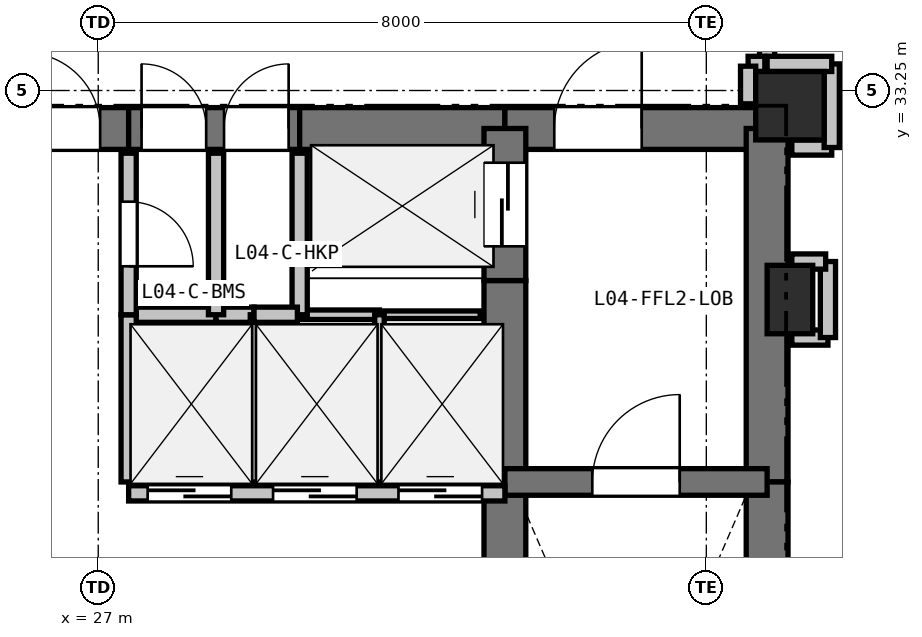
"""IFC4 building model, lengths in metres.
Left out: names, types, materials, properties, quantities, classifications, styles, units other than length and angle.
Written with IfcOpenShell. Run it as: python <this file> out.ifc"""

import sys

from ifc_helpers import new_model, si_unit, direction, frame, frame_2d, origin, origin_2d, place, context, subcontext, project, spatial, rectangle, extrude, element, fill, save


model = new_model("IFC4")
c1 = context("Model", 3, precision=1e-05, world=origin(), true_north=direction((0.0, 1.0)))
c2 = subcontext(c1, "Body", "Model", "MODEL_VIEW")
j1 = project(units=[si_unit("LENGTHUNIT", "METRE"), si_unit("PLANEANGLEUNIT", "RADIAN")], contexts=[c1])
p1 = place(None, origin())
s1 = spatial("IfcSite", under=j1, at=p1, CompositionType="ELEMENT")
p2 = place(p1, origin())
s2 = spatial("IfcBuilding", under=s1, at=p2, CompositionType="ELEMENT")
p3 = place(p2, frame((0.0, 0.0, 19.2)))
s3 = spatial("IfcBuildingStorey", under=s2, at=p3, CompositionType="ELEMENT", Elevation=19.2)
p4 = place(p3, frame((36.1, 33.05, 0.0), z_axis=(0.0, 0.0, 1.0), x_axis=(1.0, 0.0, 0.0)))
e1 = element("IfcColumn", 1, at=p4, inside=s3, PredefinedType="COLUMN", context=c2, shape_type="SweptSolid", body=[
    extrude(rectangle(XDim=0.9, YDim=0.9, at=origin_2d()), origin(), (0.0, 0.0, 1.0), 3.3),
])
p5 = place(p3, frame((36.1, 30.5, 0.0), z_axis=(0.0, 0.0, 1.0), x_axis=(1.0, 0.0, 0.0)))
e2 = element("IfcColumn", 2, at=p5, inside=s3, PredefinedType="PILASTER", context=c2, shape_type="SweptSolid", body=[
    extrude(rectangle(XDim=0.6, YDim=0.9, at=origin_2d()), origin(), (0.0, 0.0, 1.0), 3.3),
])
p6 = place(p3, frame((25.65, 32.75, 0.0), z_axis=(0.0, 0.0, 1.0), x_axis=(1.0, 0.0, 0.0)))
e3 = element("IfcWall", 3, at=p6, inside=s3, PredefinedType="SHEAR", context=c2, shape_type="SweptSolid", body=[
    extrude(rectangle(XDim=1.75, YDim=0.55, at=frame_2d((0.875, 0.0))), origin(), (0.0, 0.0, 1.0), 3.04),
])
p7 = place(p6, frame((0.375, 0.0, 0.0)))
e4 = element("IfcOpeningElement", 4, at=p7, cuts=e3, PredefinedType="OPENING", context=c2, shape_type="SweptSolid", body=[
    extrude(rectangle(XDim=1.0, YDim=2.15, at=frame_2d((0.5, 1.075))), frame((0.0, 0.285, 0.0), z_axis=(0.0, -1.0, 0.0), x_axis=(1.0, 0.0, 0.0)), (0.0, 0.0, 1.0), 0.57),
])
p8 = place(p3, frame((27.4, 32.75, 0.0), z_axis=(0.0, 0.0, 1.0), x_axis=(1.0, 0.0, 0.0)))
e5 = element("IfcWall", 5, at=p8, inside=s3, PredefinedType="SHEAR", context=c2, shape_type="SweptSolid", body=[
    extrude(rectangle(XDim=2.25, YDim=0.55, at=frame_2d((1.125, 0.0))), origin(), (0.0, 0.0, 1.0), 3.04),
])
p9 = place(p8, frame((0.17, 0.0, 0.0)))
e6 = element("IfcOpeningElement", 6, at=p9, cuts=e5, PredefinedType="OPENING", context=c2, shape_type="SweptSolid", body=[
    extrude(rectangle(XDim=0.85, YDim=2.1, at=frame_2d((0.425, 1.05))), frame((0.0, 0.285, 0.0), z_axis=(0.0, -1.0, 0.0), x_axis=(1.0, 0.0, 0.0)), (0.0, 0.0, 1.0), 0.57),
])
p10 = place(p8, frame((1.255, 0.0, 0.0)))
e7 = element("IfcOpeningElement", 7, at=p10, cuts=e5, PredefinedType="OPENING", context=c2, shape_type="SweptSolid", body=[
    extrude(rectangle(XDim=0.85, YDim=2.1, at=frame_2d((0.425, 1.05))), frame((0.0, 0.285, 0.0), z_axis=(0.0, -1.0, 0.0), x_axis=(1.0, 0.0, 0.0)), (0.0, 0.0, 1.0), 0.57),
])
p11 = place(p3, frame((29.65, 32.75, 0.0), z_axis=(0.0, 0.0, 1.0), x_axis=(1.0, 0.0, 0.0)))
e8 = element("IfcWall", 8, at=p11, inside=s3, PredefinedType="SHEAR", context=c2, shape_type="SweptSolid", body=[
    extrude(rectangle(XDim=2.7, YDim=0.55, at=frame_2d((1.35, 0.0))), origin(), (0.0, 0.0, 1.0), 3.04),
])
p12 = place(p3, frame((32.35, 32.75, 0.0), z_axis=(0.0, 0.0, 1.0), x_axis=(1.0, 0.0, 0.0)))
e9 = element("IfcWall", 9, at=p12, inside=s3, PredefinedType="SHEAR", context=c2, shape_type="SweptSolid", body=[
    extrude(rectangle(XDim=3.45, YDim=0.55, at=frame_2d((1.725, 0.0))), origin(), (0.0, 0.0, 1.0), 3.04),
])
p13 = place(p12, frame((0.65, 0.0, 0.0)))
e10 = element("IfcOpeningElement", 10, at=p13, cuts=e9, PredefinedType="OPENING", context=c2, shape_type="SweptSolid", body=[
    extrude(rectangle(XDim=1.15, YDim=2.15, at=frame_2d((0.575, 1.075))), frame((0.0, 0.285, 0.0), z_axis=(0.0, -1.0, 0.0), x_axis=(1.0, 0.0, 0.0)), (0.0, 0.0, 1.0), 0.57),
])
p14 = place(p3, frame((35.8, 32.75, 0.0), z_axis=(0.0, 0.0, 1.0), x_axis=(0.0, -1.0, 0.0)))
e11 = element("IfcWall", 11, at=p14, inside=s3, PredefinedType="SHEAR", context=c2, shape_type="SweptSolid", body=[
    extrude(rectangle(XDim=4.65, YDim=0.55, at=frame_2d((2.325, 0.0))), origin(), (0.0, 0.0, 1.0), 3.04),
])
p15 = place(p3, frame((35.8, 28.1, 0.0), z_axis=(0.0, 0.0, 1.0), x_axis=(0.0, -1.0, 0.0)))
e12 = element("IfcWall", 12, at=p15, inside=s3, PredefinedType="SHEAR", context=c2, shape_type="SweptSolid", body=[
    extrude(rectangle(XDim=7.35, YDim=0.55, at=frame_2d((3.675, 0.0))), origin(), (0.0, 0.0, 1.0), 3.04),
])
p16 = place(p3, frame((32.35, 25.55, 0.0), z_axis=(0.0, 0.0, 1.0), x_axis=(0.0, 1.0, 0.0)))
e13 = element("IfcWall", 13, at=p16, inside=s3, PredefinedType="SHEAR", context=c2, shape_type="SweptSolid", body=[
    extrude(rectangle(XDim=2.4, YDim=0.55, at=frame_2d((1.2, 0.0))), origin(), (0.0, 0.0, 1.0), 3.04),
])
p17 = place(p3, frame((32.35, 27.95, 0.0), z_axis=(0.0, 0.0, 1.0), x_axis=(0.0, 1.0, 0.0)))
e14 = element("IfcWall", 14, at=p17, inside=s3, PredefinedType="SHEAR", context=c2, shape_type="SweptSolid", body=[
    extrude(rectangle(XDim=2.8, YDim=0.55, at=frame_2d((1.4, 0.0))), origin(), (0.0, 0.0, 1.0), 3.04),
])
p18 = place(p3, frame((32.35, 30.75, 0.0), z_axis=(0.0, 0.0, 1.0), x_axis=(0.0, 1.0, 0.0)))
e15 = element("IfcWall", 15, at=p18, inside=s3, PredefinedType="SHEAR", context=c2, shape_type="SweptSolid", body=[
    extrude(rectangle(XDim=2.0, YDim=0.55, at=frame_2d((1.0, 0.0))), origin(), (0.0, 0.0, 1.0), 3.04),
])
p19 = place(p18, frame((0.45, 0.0, 0.0)))
e16 = element("IfcOpeningElement", 16, at=p19, cuts=e15, PredefinedType="OPENING", context=c2, shape_type="SweptSolid", body=[
    extrude(rectangle(XDim=1.1, YDim=2.15, at=frame_2d((0.55, 1.075))), frame((0.0, 0.285, 0.0), z_axis=(0.0, -1.0, 0.0), x_axis=(1.0, 0.0, 0.0)), (0.0, 0.0, 1.0), 0.57),
])
p20 = place(p3, frame((32.35, 28.1, 0.0), z_axis=(0.0, 0.0, 1.0), x_axis=(1.0, 0.0, 0.0)))
e17 = element("IfcWall", 17, at=p20, inside=s3, PredefinedType="SHEAR", context=c2, shape_type="SweptSolid", body=[
    extrude(rectangle(XDim=3.45, YDim=0.35, at=frame_2d((1.725, 0.0))), origin(), (0.0, 0.0, 1.0), 3.04),
])
p21 = place(p20, frame((1.15, 0.0, 0.0)))
e18 = element("IfcOpeningElement", 18, at=p21, cuts=e17, PredefinedType="OPENING", context=c2, shape_type="SweptSolid", body=[
    extrude(rectangle(XDim=1.15, YDim=2.15, at=frame_2d((0.575, 1.075))), frame((0.0, 0.185, 0.0), z_axis=(0.0, -1.0, 0.0), x_axis=(1.0, 0.0, 0.0)), (0.0, 0.0, 1.0), 0.37),
])
p22 = place(p3, frame((27.4, 27.95, 0.0), z_axis=(0.0, 0.0, 1.0), x_axis=(1.0, 0.0, 0.0)))
e19 = element("IfcWall", 19, at=p22, inside=s3, PredefinedType="PARTITIONING", context=c2, shape_type="SweptSolid", body=[
    extrude(rectangle(XDim=4.95, YDim=0.2, at=frame_2d((2.475, 0.0))), origin(), (0.0, 0.0, 1.0), 3.04),
])
p23 = place(p22, frame((0.25, 0.0, 0.0)))
e20 = element("IfcOpeningElement", 20, at=p23, cuts=e19, PredefinedType="OPENING", context=c2, shape_type="SweptSolid", body=[
    extrude(rectangle(XDim=1.1, YDim=2.15, at=frame_2d((0.55, 1.075))), frame((0.0, 0.11, 0.0), z_axis=(0.0, -1.0, 0.0), x_axis=(1.0, 0.0, 0.0)), (0.0, 0.0, 1.0), 0.22),
])
p24 = place(p22, frame((1.9, 0.0, 0.0)))
e21 = element("IfcOpeningElement", 21, at=p24, cuts=e19, PredefinedType="OPENING", context=c2, shape_type="SweptSolid", body=[
    extrude(rectangle(XDim=1.1, YDim=2.15, at=frame_2d((0.55, 1.075))), frame((0.0, 0.11, 0.0), z_axis=(0.0, -1.0, 0.0), x_axis=(1.0, 0.0, 0.0)), (0.0, 0.0, 1.0), 0.22),
])
p25 = place(p22, frame((3.55, 0.0, 0.0)))
e22 = element("IfcOpeningElement", 22, at=p25, cuts=e19, PredefinedType="OPENING", context=c2, shape_type="SweptSolid", body=[
    extrude(rectangle(XDim=1.1, YDim=2.15, at=frame_2d((0.55, 1.075))), frame((0.0, 0.11, 0.0), z_axis=(0.0, -1.0, 0.0), x_axis=(1.0, 0.0, 0.0)), (0.0, 0.0, 1.0), 0.22),
])
p26 = place(p3, frame((32.025, 30.3, 0.0), z_axis=(0.0, 0.0, 1.0), x_axis=(-1.0, 0.0, 0.0)))
e23 = element("IfcWall", 23, at=p26, inside=s3, PredefinedType="PARTITIONING", context=c2, shape_type="SweptSolid", body=[
    extrude(rectangle(XDim=1.325, YDim=0.1, at=frame_2d((0.663, 0.0))), origin(), (0.0, 0.0, 1.0), 3.04),
])
p27 = place(p3, frame((30.7, 30.3, 0.0), z_axis=(0.0, 0.0, 1.0), x_axis=(-1.0, 0.0, 0.0)))
e24 = element("IfcWall", 24, at=p27, inside=s3, PredefinedType="PARTITIONING", context=c2, shape_type="SweptSolid", body=[
    extrude(rectangle(XDim=1.05, YDim=0.125, at=frame_2d((0.525, 0.0))), origin(), (0.0, 0.0, 1.0), 3.04),
])
p28 = place(p3, frame((29.65, 30.3, 0.0), z_axis=(0.0, 0.0, 1.0), x_axis=(0.0, 1.0, 0.0)))
e25 = element("IfcWall", 25, at=p28, inside=s3, PredefinedType="PARTITIONING", context=c2, shape_type="SweptSolid", body=[
    extrude(rectangle(XDim=2.125, YDim=0.2, at=frame_2d((1.062, 0.0))), origin(), (0.0, 0.0, 1.0), 3.04),
])
p29 = place(p3, frame((27.4, 30.3, 0.0), z_axis=(0.0, 0.0, 1.0), x_axis=(1.0, 0.0, 0.0)))
e26 = element("IfcWall", 26, at=p29, inside=s3, PredefinedType="PARTITIONING", context=c2, shape_type="SweptSolid", body=[
    extrude(rectangle(XDim=1.15, YDim=0.2, at=frame_2d((0.575, 0.0))), origin(), (0.0, 0.0, 1.0), 3.04),
])
p30 = place(p3, frame((28.55, 30.3, 0.0), z_axis=(0.0, 0.0, 1.0), x_axis=(1.0, 0.0, 0.0)))
e27 = element("IfcWall", 27, at=p30, inside=s3, PredefinedType="PARTITIONING", context=c2, shape_type="SweptSolid", body=[
    extrude(rectangle(XDim=0.5, YDim=0.2, at=frame_2d((0.25, 0.0))), origin(), (0.0, 0.0, 1.0), 3.04),
])
p31 = place(p3, frame((29.05, 30.3, 0.0), z_axis=(0.0, 0.0, 1.0), x_axis=(0.0, -1.0, 0.0)))
e28 = element("IfcWall", 28, at=p31, inside=s3, PredefinedType="PARTITIONING", context=c2, shape_type="SweptSolid", body=[
    extrude(rectangle(XDim=2.2, YDim=0.1, at=frame_2d((1.1, 0.0))), origin(), (0.0, 0.0, 1.0), 3.04),
])
p32 = place(p3, frame((27.4, 28.1, 0.0), z_axis=(0.0, 0.0, 1.0), x_axis=(0.0, 1.0, 0.0)))
e29 = element("IfcWall", 29, at=p32, inside=s3, PredefinedType="PARTITIONING", context=c2, shape_type="SweptSolid", body=[
    extrude(rectangle(XDim=2.2, YDim=0.2, at=frame_2d((1.1, 0.0))), origin(), (0.0, 0.0, 1.0), 3.04),
])
p33 = place(p3, frame((29.05, 30.3, 0.0), z_axis=(0.0, 0.0, 1.0), x_axis=(1.0, 0.0, 0.0)))
e30 = element("IfcWall", 30, at=p33, inside=s3, PredefinedType="PARTITIONING", context=c2, shape_type="SweptSolid", body=[
    extrude(rectangle(XDim=0.57, YDim=0.2, at=frame_2d((0.285, 0.0))), origin(), (0.0, 0.0, 1.0), 3.04),
])
p34 = place(p3, frame((30.7, 30.3, 0.0), z_axis=(0.0, 0.0, 1.0), x_axis=(0.0, -1.0, 0.0)))
e31 = element("IfcWall", 31, at=p34, inside=s3, PredefinedType="PARTITIONING", context=c2, shape_type="SweptSolid", body=[
    extrude(rectangle(XDim=2.2, YDim=0.125, at=frame_2d((1.1, 0.0))), origin(), (0.0, 0.0, 1.0), 3.04),
])
p35 = place(p3, frame((27.4, 32.425, 0.0), z_axis=(0.0, 0.0, 1.0), x_axis=(0.0, -1.0, 0.0)))
e32 = element("IfcWall", 32, at=p35, inside=s3, PredefinedType="PARTITIONING", context=c2, shape_type="SweptSolid", body=[
    extrude(rectangle(XDim=2.125, YDim=0.2, at=frame_2d((1.062, 0.0))), origin(), (0.0, 0.0, 1.0), 3.04),
])
p36 = place(p35, frame((0.637, 0.0, 0.0)))
e33 = element("IfcOpeningElement", 33, at=p36, cuts=e32, PredefinedType="OPENING", context=c2, shape_type="SweptSolid", body=[
    extrude(rectangle(XDim=0.85, YDim=2.1, at=frame_2d((0.425, 1.05))), frame((0.0, 0.11, 0.0), z_axis=(0.0, -1.0, 0.0), x_axis=(1.0, 0.0, 0.0)), (0.0, 0.0, 1.0), 0.22),
])
p37 = place(p3, frame((35.8, 35.35, 0.0), z_axis=(0.0, 0.0, 1.0), x_axis=(0.0, -1.0, 0.0)))
e34 = element("IfcWall", 34, at=p37, inside=s3, PredefinedType="PARTITIONING", context=c2, shape_type="SweptSolid", body=[
    extrude(rectangle(XDim=1.75, YDim=0.2, at=frame_2d((0.875, 0.0))), origin(), (0.0, 0.0, 1.0), 3.04),
])
p38 = place(p37, frame((0.375, 0.0, 0.0)))
e35 = element("IfcOpeningElement", 35, at=p38, cuts=e34, PredefinedType="OPENING", context=c2, shape_type="SweptSolid", body=[
    extrude(rectangle(XDim=1.0, YDim=2.15, at=frame_2d((0.5, 1.075))), frame((0.0, 0.11, 0.0), z_axis=(0.0, -1.0, 0.0), x_axis=(1.0, 0.0, 0.0)), (0.0, 0.0, 1.0), 0.22),
])
p39 = place(p3, frame((35.77, 33.6, 0.0), z_axis=(0.0, 0.0, 1.0), x_axis=(-1.0, 0.0, 0.0)))
e36 = element("IfcWall", 36, at=p39, inside=s3, PredefinedType="PARTITIONING", context=c2, shape_type="SweptSolid", body=[
    extrude(rectangle(XDim=0.22, YDim=0.2, at=frame_2d((0.11, 0.0))), origin(), (0.0, 0.0, 1.0), 3.04),
])
p40 = place(p3, frame((35.55, 33.57, 0.0), z_axis=(0.0, 0.0, 1.0), x_axis=(0.0, -1.0, 0.0)))
e37 = element("IfcWall", 37, at=p40, inside=s3, PredefinedType="PARTITIONING", context=c2, shape_type="SweptSolid", body=[
    extrude(rectangle(XDim=0.495, YDim=0.2, at=frame_2d((0.248, 0.0))), origin(), (0.0, 0.0, 1.0), 2.488),
])
p41 = place(p3, frame((36.125, 30.0, 0.0), z_axis=(0.0, 0.0, 1.0), x_axis=(1.0, 0.0, 0.0)))
e38 = element("IfcWall", 38, at=p41, inside=s3, PredefinedType="PARTITIONING", context=c2, shape_type="SweptSolid", body=[
    extrude(rectangle(XDim=0.475, YDim=0.2, at=frame_2d((0.238, 0.0))), origin(), (0.0, 0.0, 1.0), 2.488),
])
p42 = place(p3, frame((36.6, 30.0, 0.0), z_axis=(0.0, 0.0, 1.0), x_axis=(0.0, 1.0, 0.0)))
e39 = element("IfcWall", 39, at=p42, inside=s3, PredefinedType="PARTITIONING", context=c2, shape_type="SweptSolid", body=[
    extrude(rectangle(XDim=1.0, YDim=0.2, at=frame_2d((0.5, 0.0))), origin(), (0.0, 0.0, 1.0), 3.04),
])
p43 = place(p3, frame((36.57, 31.0, 0.0), z_axis=(0.0, 0.0, 1.0), x_axis=(-1.0, 0.0, 0.0)))
e40 = element("IfcWall", 40, at=p43, inside=s3, PredefinedType="PARTITIONING", context=c2, shape_type="SweptSolid", body=[
    extrude(rectangle(XDim=0.445, YDim=0.2, at=frame_2d((0.223, 0.0))), origin(), (0.0, 0.0, 1.0), 2.488),
])
p44 = place(p3, frame((36.125, 32.5, 0.0), z_axis=(0.0, 0.0, 1.0), x_axis=(1.0, 0.0, 0.0)))
e41 = element("IfcWall", 41, at=p44, inside=s3, PredefinedType="PARTITIONING", context=c2, shape_type="SweptSolid", body=[
    extrude(rectangle(XDim=0.525, YDim=0.2, at=frame_2d((0.262, 0.0))), origin(), (0.0, 0.0, 1.0), 2.488),
])
p45 = place(p3, frame((36.65, 32.5, 0.0), z_axis=(0.0, 0.0, 1.0), x_axis=(0.0, 1.0, 0.0)))
e42 = element("IfcWall", 42, at=p45, inside=s3, PredefinedType="PARTITIONING", context=c2, shape_type="SweptSolid", body=[
    extrude(rectangle(XDim=1.1, YDim=0.2, at=frame_2d((0.55, 0.0))), origin(), (0.0, 0.0, 1.0), 2.338),
])
p46 = place(p3, frame((36.65, 33.6, 0.0), z_axis=(0.0, 0.0, 1.0), x_axis=(-1.0, 0.0, 0.0)))
e43 = element("IfcWall", 43, at=p46, inside=s3, PredefinedType="PARTITIONING", context=c2, shape_type="SweptSolid", body=[
    extrude(rectangle(XDim=0.85, YDim=0.2, at=frame_2d((0.425, 0.0))), origin(), (0.0, 0.0, 1.0), 2.338),
])
p47 = place(p3, frame((28.55, 32.425, 0.0), z_axis=(0.0, 0.0, 1.0), x_axis=(0.0, -1.0, 0.0)))
e44 = element("IfcWall", 44, at=p47, inside=s3, PredefinedType="PARTITIONING", context=c2, shape_type="SweptSolid", body=[
    extrude(rectangle(XDim=2.125, YDim=0.2, at=frame_2d((1.062, 0.0))), origin(), (0.0, 0.0, 1.0), 3.04),
])
p48 = place(p23, origin())
e45 = element("IfcDoor", 45, at=p48, inside=s3, OperationType="SLIDING_TO_LEFT", PredefinedType="DOOR", context=c2, shape_type="SweptSolid", body=[
    extrude(rectangle(XDim=1.1, YDim=2.15, at=frame_2d((0.55, 1.075))), frame((0.0, 0.025, 0.0), z_axis=(0.0, -1.0, 0.0), x_axis=(1.0, 0.0, 0.0)), (0.0, 0.0, 1.0), 0.05),
])
fill(e20, e45)
p49 = place(p24, origin())
e46 = element("IfcDoor", 46, at=p49, inside=s3, OperationType="SLIDING_TO_LEFT", PredefinedType="DOOR", context=c2, shape_type="SweptSolid", body=[
    extrude(rectangle(XDim=1.1, YDim=2.15, at=frame_2d((0.55, 1.075))), frame((0.0, 0.025, 0.0), z_axis=(0.0, -1.0, 0.0), x_axis=(1.0, 0.0, 0.0)), (0.0, 0.0, 1.0), 0.05),
])
fill(e21, e46)
p50 = place(p25, origin())
e47 = element("IfcDoor", 47, at=p50, inside=s3, OperationType="SLIDING_TO_LEFT", PredefinedType="DOOR", context=c2, shape_type="SweptSolid", body=[
    extrude(rectangle(XDim=1.1, YDim=2.15, at=frame_2d((0.55, 1.075))), frame((0.0, 0.025, 0.0), z_axis=(0.0, -1.0, 0.0), x_axis=(1.0, 0.0, 0.0)), (0.0, 0.0, 1.0), 0.05),
])
fill(e22, e47)
p51 = place(p7, origin())
e48 = element("IfcDoor", 48, at=p51, inside=s3, OperationType="SINGLE_SWING_LEFT", PredefinedType="DOOR", context=c2, shape_type="SweptSolid", body=[
    extrude(rectangle(XDim=1.0, YDim=2.15, at=frame_2d((0.5, 1.075))), frame((0.0, 0.025, 0.0), z_axis=(0.0, -1.0, 0.0), x_axis=(1.0, 0.0, 0.0)), (0.0, 0.0, 1.0), 0.05),
])
fill(e4, e48)
p52 = place(p19, origin())
e49 = element("IfcDoor", 49, at=p52, inside=s3, OperationType="SLIDING_TO_LEFT", PredefinedType="DOOR", context=c2, shape_type="SweptSolid", body=[
    extrude(rectangle(XDim=1.1, YDim=2.15, at=frame_2d((0.55, 1.075))), frame((0.0, 0.025, 0.0), z_axis=(0.0, -1.0, 0.0), x_axis=(1.0, 0.0, 0.0)), (0.0, 0.0, 1.0), 0.05),
])
fill(e16, e49)
p53 = place(p21, origin())
e50 = element("IfcDoor", 50, at=p53, inside=s3, OperationType="SINGLE_SWING_RIGHT", PredefinedType="DOOR", context=c2, shape_type="SweptSolid", body=[
    extrude(rectangle(XDim=1.15, YDim=2.15, at=frame_2d((0.575, 1.075))), frame((0.0, 0.025, 0.0), z_axis=(0.0, -1.0, 0.0), x_axis=(1.0, 0.0, 0.0)), (0.0, 0.0, 1.0), 0.05),
])
fill(e18, e50)
p54 = place(p13, origin())
e51 = element("IfcDoor", 51, at=p54, inside=s3, OperationType="SINGLE_SWING_RIGHT", PredefinedType="DOOR", context=c2, shape_type="SweptSolid", body=[
    extrude(rectangle(XDim=1.15, YDim=2.15, at=frame_2d((0.575, 1.075))), frame((0.0, 0.025, 0.0), z_axis=(0.0, -1.0, 0.0), x_axis=(1.0, 0.0, 0.0)), (0.0, 0.0, 1.0), 0.05),
])
fill(e10, e51)
p55 = place(p36, origin())
e52 = element("IfcDoor", 52, at=p55, inside=s3, OperationType="SINGLE_SWING_RIGHT", PredefinedType="DOOR", context=c2, shape_type="SweptSolid", body=[
    extrude(rectangle(XDim=0.85, YDim=2.1, at=frame_2d((0.425, 1.05))), frame((0.0, 0.025, 0.0), z_axis=(0.0, -1.0, 0.0), x_axis=(1.0, 0.0, 0.0)), (0.0, 0.0, 1.0), 0.05),
])
fill(e33, e52)
p56 = place(p9, origin())
e53 = element("IfcDoor", 53, at=p56, inside=s3, OperationType="SINGLE_SWING_LEFT", PredefinedType="DOOR", context=c2, shape_type="SweptSolid", body=[
    extrude(rectangle(XDim=0.85, YDim=2.1, at=frame_2d((0.425, 1.05))), frame((0.0, 0.025, 0.0), z_axis=(0.0, -1.0, 0.0), x_axis=(1.0, 0.0, 0.0)), (0.0, 0.0, 1.0), 0.05),
])
fill(e6, e53)
p57 = place(p10, origin())
e54 = element("IfcDoor", 54, at=p57, inside=s3, OperationType="SINGLE_SWING_RIGHT", PredefinedType="DOOR", context=c2, shape_type="SweptSolid", body=[
    extrude(rectangle(XDim=0.85, YDim=2.1, at=frame_2d((0.425, 1.05))), frame((0.0, 0.025, 0.0), z_axis=(0.0, -1.0, 0.0), x_axis=(1.0, 0.0, 0.0)), (0.0, 0.0, 1.0), 0.05),
])
fill(e7, e54)
save(model, sys.argv[1])
